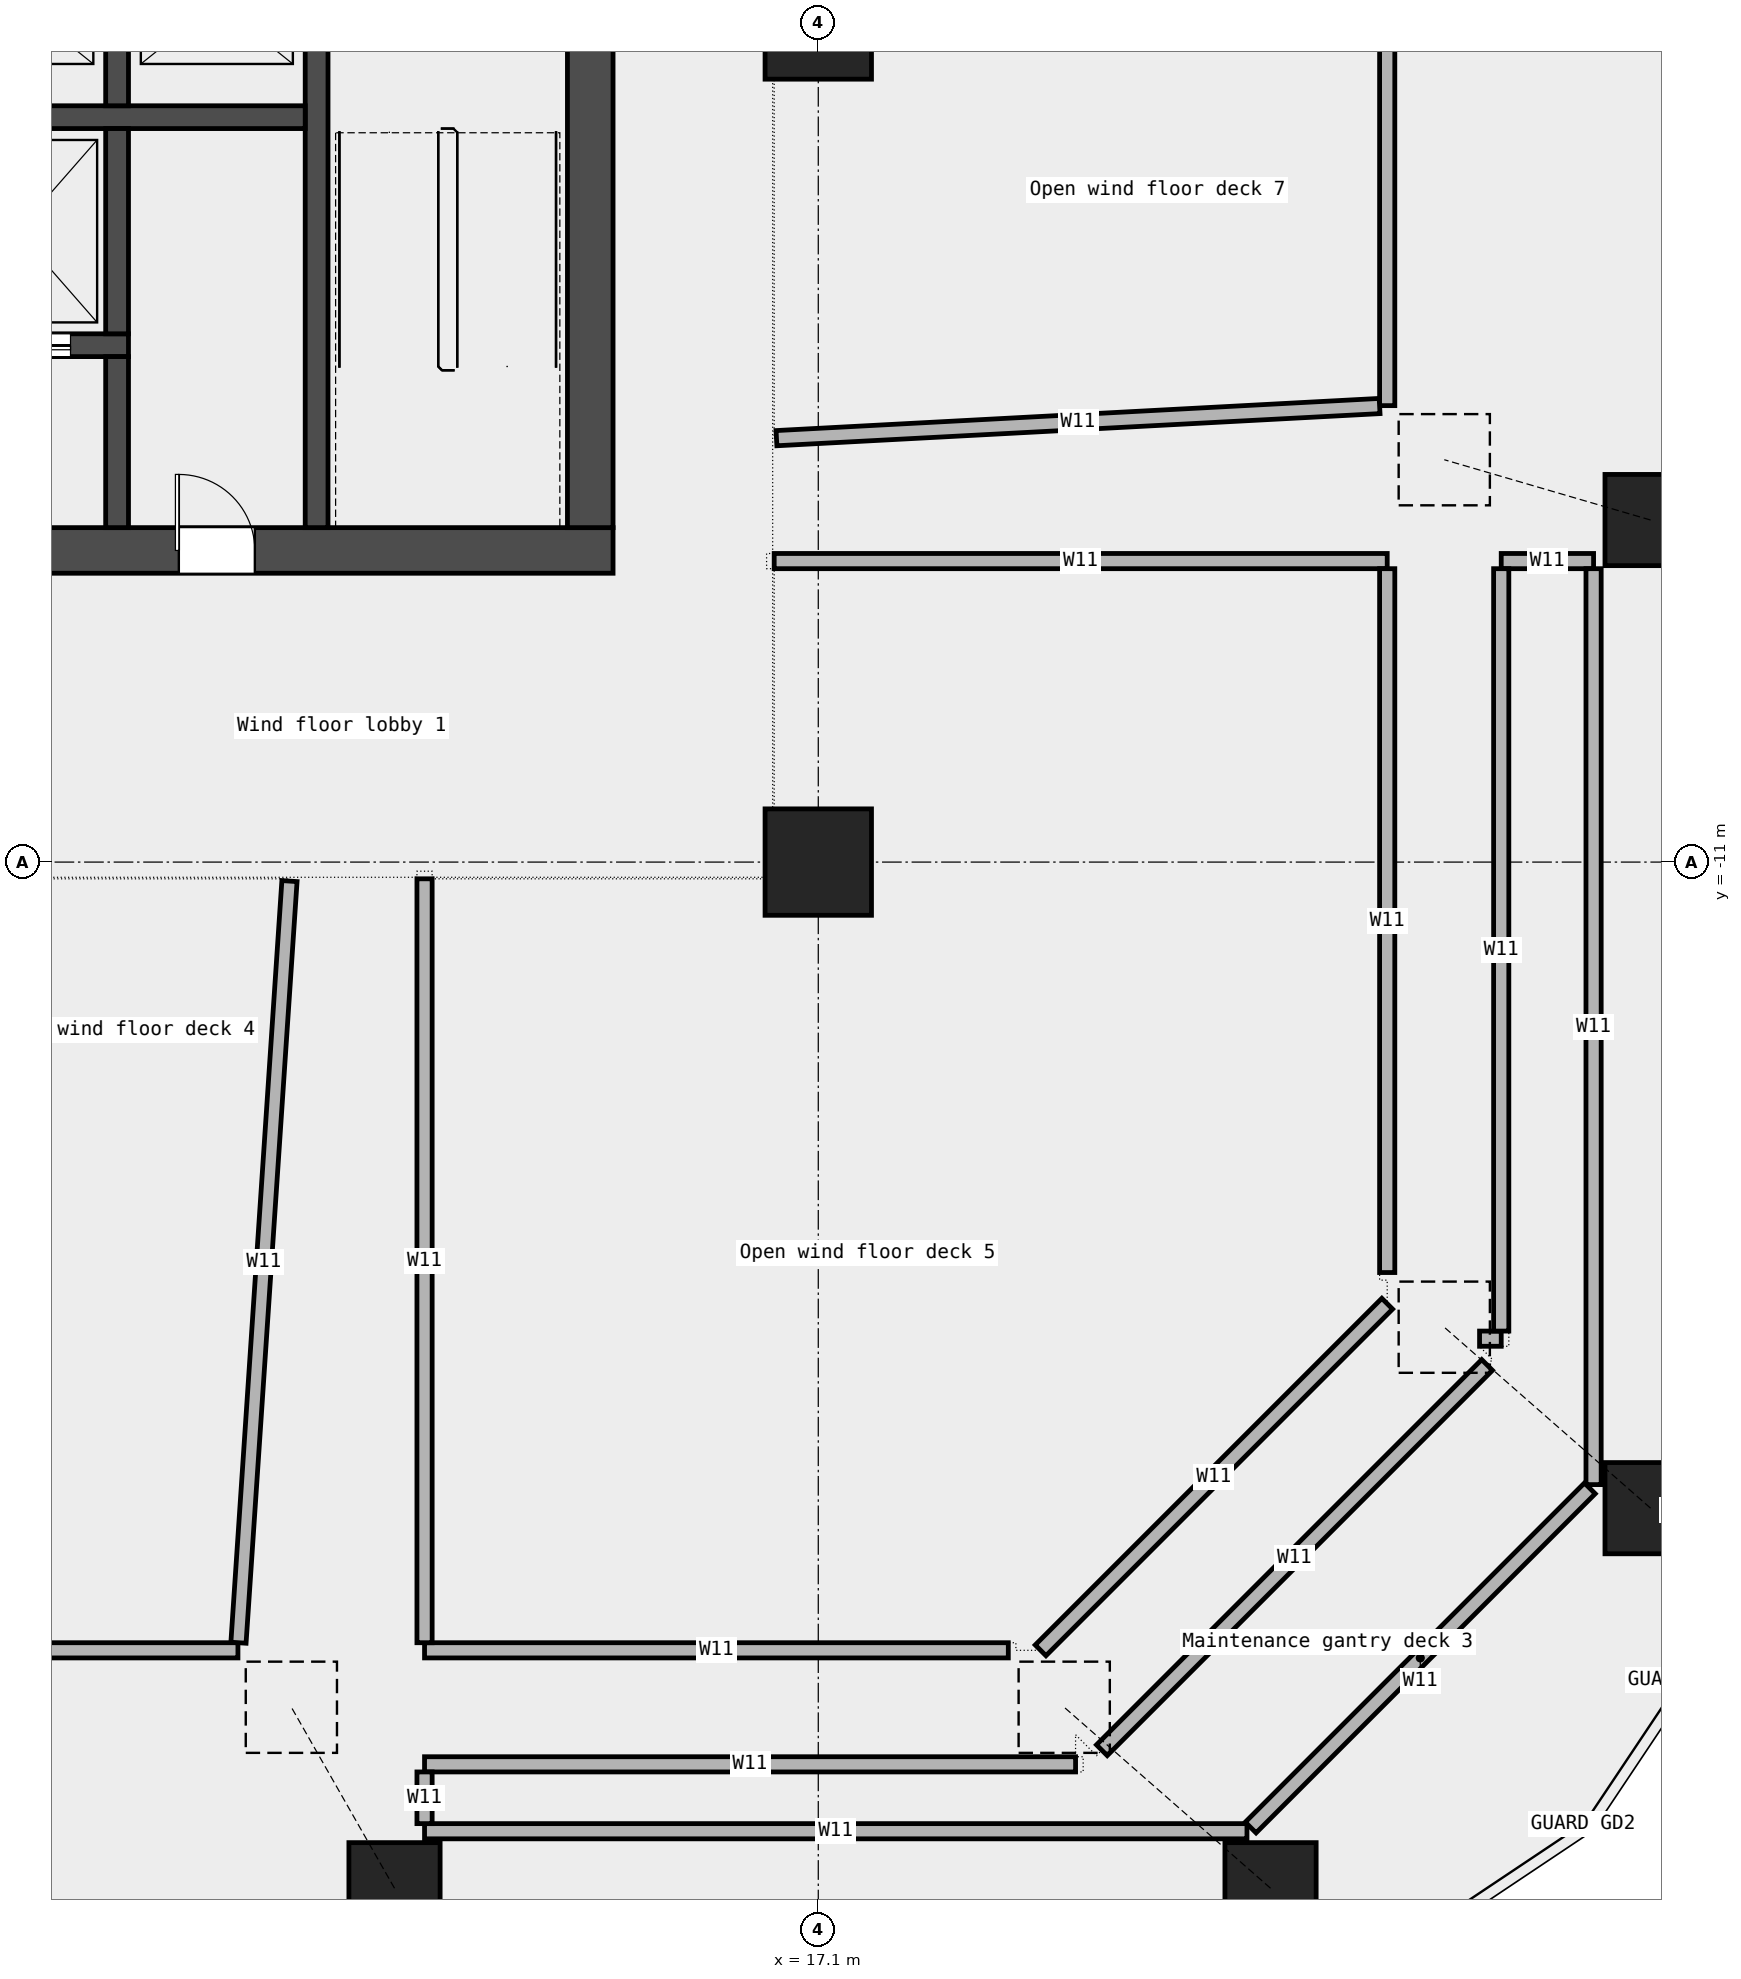
"""IFC4 building model, lengths in metres.
Left out: names, types, materials, properties, quantities, classifications, styles, units other than length and angle.
Written with IfcOpenShell. Run it as: python <this file> out.ifc"""

import sys

from ifc_helpers import new_model, si_unit, direction, frame, frame_2d, origin, origin_2d, place, context, subcontext, project, spatial, rectangle, extrude, element, fill, save


model = new_model("IFC4")
c1 = context("Model", 3, precision=1e-05, world=origin(), true_north=direction((0.0, 1.0)))
c2 = subcontext(c1, "Body", "Model", "MODEL_VIEW")
j1 = project(units=[si_unit("LENGTHUNIT", "METRE"), si_unit("PLANEANGLEUNIT", "RADIAN")], contexts=[c1])
p1 = place(None, origin())
s1 = spatial("IfcSite", under=j1, at=p1, CompositionType="ELEMENT")
p2 = place(p1, origin())
s2 = spatial("IfcBuilding", under=s1, at=p2, CompositionType="ELEMENT")
p3 = place(p2, frame((0.0, 0.0, 148.6)))
s3 = spatial("IfcBuildingStorey", under=s2, at=p3, CompositionType="ELEMENT", Elevation=148.6)
p4 = place(p3, frame((11.525, -24.5, 0.0), z_axis=(-0.160463379213, 0.281547116603, 0.94603526629), x_axis=(-0.868801799195, -0.495160008196, 0.0)))
e1 = element("IfcColumn", 1, at=p4, inside=s3, PredefinedType="COLUMN", context=c2, shape_type="SweptSolid", body=[
    extrude(rectangle(XDim=1.2, YDim=1.2, at=origin_2d()), origin(), (0.0, 0.0, 1.0), 8.456),
])
for number, where, z_axis, x_axis in (
    (2, (23.05, -24.5, 0.0), (-0.309, 0.271, 0.911), (-0.659, -0.752, 0.0)),
    (3, (28.05, -19.5, 0.0), (-0.309, 0.271, 0.911), (-0.659, -0.752, 0.0)),
):
    element("IfcColumn", number, at=place(p3, frame(where, z_axis=z_axis, x_axis=x_axis)), inside=s3, PredefinedType="COLUMN", context=c2, shape_type="SweptSolid", body=[
        extrude(rectangle(XDim=1.2, YDim=1.2, at=origin_2d()), origin(), (0.0, 0.0, 1.0), 8.777),
    ])
p5 = place(p3, frame((28.05, -6.5, 0.0), z_axis=(-0.319895858585, 0.093511561468, 0.942826721902), x_axis=(-0.280576780783, -0.95983158423, 0.0)))
e4 = element("IfcColumn", 4, at=p5, inside=s3, PredefinedType="COLUMN", context=c2, shape_type="SweptSolid", body=[
    extrude(rectangle(XDim=1.2, YDim=1.2, at=origin_2d()), origin(), (0.0, 0.0, 1.0), 8.485),
])
for number, where, z_axis, x_axis in (
    (5, (17.1, -11.0, 0.0), (0.0, 0.0, 1.0), (1.0, 0.0, 0.0)),
    (6, (17.1, 0.0, 0.0), (0.0, 0.0, 1.0), (1.0, 0.0, 0.0)),
):
    element("IfcColumn", number, at=place(p3, frame(where, z_axis=z_axis, x_axis=x_axis)), inside=s3, PredefinedType="COLUMN", context=c2, shape_type="SweptSolid", body=[
        extrude(rectangle(XDim=1.4, YDim=1.4, at=origin_2d()), origin(), (0.0, 0.0, 1.0), 8.0),
    ])
p6 = place(p3, frame((11.92, -23.75, 0.0), z_axis=(0.0, 0.0, 1.0), x_axis=(1.0, 0.0, 0.0)))
e7 = element("IfcWall", 7, at=p6, inside=s3, PredefinedType="PARTITIONING", context=c2, shape_type="SweptSolid", body=[
    extrude(rectangle(XDim=10.82, YDim=0.2, at=frame_2d((5.41, 0.0))), origin(), (0.0, 0.0, 1.0), 8.0),
])
p7 = place(p3, frame((11.92, -22.87, 0.0), z_axis=(0.0, 0.0, 1.0), x_axis=(1.0, 0.0, 0.0)))
e8 = element("IfcWall", 8, at=p7, inside=s3, PredefinedType="PARTITIONING", context=c2, shape_type="SweptSolid", body=[
    extrude(rectangle(XDim=8.565, YDim=0.2, at=frame_2d((4.283, 0.0))), origin(), (0.0, 0.0, 1.0), 8.0),
])
p8 = place(p3, frame((0.6, -21.37, 0.0), z_axis=(0.0, 0.0, 1.0), x_axis=(1.0, 0.0, 0.0)))
e9 = element("IfcWall", 9, at=p8, inside=s3, PredefinedType="PARTITIONING", context=c2, shape_type="SweptSolid", body=[
    extrude(rectangle(XDim=8.865, YDim=0.2, at=frame_2d((4.433, 0.0))), origin(), (0.0, 0.0, 1.0), 8.0),
])
p9 = place(p3, frame((11.92, -21.37, 0.0), z_axis=(0.0, 0.0, 1.0), x_axis=(1.0, 0.0, 0.0)))
e10 = element("IfcWall", 10, at=p9, inside=s3, PredefinedType="PARTITIONING", context=c2, shape_type="SweptSolid", body=[
    extrude(rectangle(XDim=7.68, YDim=0.2, at=frame_2d((3.84, 0.0))), origin(), (0.0, 0.0, 1.0), 8.0),
])
p10 = place(p3, frame((25.8, -17.27, 0.0), z_axis=(0.0, 0.0, 1.0), x_axis=(1.0, 0.0, 0.0)))
e11 = element("IfcWall", 11, at=p10, inside=s3, PredefinedType="PARTITIONING", context=c2, shape_type="SweptSolid", body=[
    extrude(rectangle(XDim=0.285, YDim=0.2, at=frame_2d((0.143, 0.0))), origin(), (0.0, 0.0, 1.0), 8.0),
])
p11 = place(p3, frame((16.52, -7.04, 0.0), z_axis=(0.0, 0.0, 1.0), x_axis=(1.0, 0.0, 0.0)))
e12 = element("IfcWall", 12, at=p11, inside=s3, PredefinedType="PARTITIONING", context=c2, shape_type="SweptSolid", body=[
    extrude(rectangle(XDim=8.065, YDim=0.2, at=frame_2d((4.032, 0.0))), origin(), (0.0, 0.0, 1.0), 8.0),
])
p12 = place(p3, frame((26.085, -7.04, 0.0), z_axis=(0.0, 0.0, 1.0), x_axis=(1.0, 0.0, 0.0)))
e13 = element("IfcWall", 13, at=p12, inside=s3, PredefinedType="PARTITIONING", context=c2, shape_type="SweptSolid", body=[
    extrude(rectangle(XDim=1.215, YDim=0.2, at=frame_2d((0.607, 0.0))), origin(), (0.0, 0.0, 1.0), 8.0),
])
p13 = place(p3, frame((11.92, -23.65, 0.0), z_axis=(0.0, 0.0, 1.0), x_axis=(0.0, 1.0, 0.0)))
e14 = element("IfcWall", 14, at=p13, inside=s3, PredefinedType="PARTITIONING", context=c2, shape_type="SweptSolid", body=[
    extrude(rectangle(XDim=0.68, YDim=0.2, at=frame_2d((0.34, 0.0))), origin(), (0.0, 0.0, 1.0), 8.0),
])
p14 = place(p3, frame((11.92, -21.27, 0.0), z_axis=(0.0, 0.0, 1.0), x_axis=(0.0, 1.0, 0.0)))
e15 = element("IfcWall", 15, at=p14, inside=s3, PredefinedType="PARTITIONING", context=c2, shape_type="SweptSolid", body=[
    extrude(rectangle(XDim=10.05, YDim=0.2, at=frame_2d((5.025, 0.0))), origin(), (0.0, 0.0, 1.0), 8.0),
])
p15 = place(p3, frame((24.585, -16.4, 0.0), z_axis=(0.0, 0.0, 1.0), x_axis=(0.0, 1.0, 0.0)))
e16 = element("IfcWall", 16, at=p15, inside=s3, PredefinedType="PARTITIONING", context=c2, shape_type="SweptSolid", body=[
    extrude(rectangle(XDim=9.26, YDim=0.2, at=frame_2d((4.63, 0.0))), origin(), (0.0, 0.0, 1.0), 8.0),
])
p16 = place(p3, frame((24.585, -4.995, 0.0), z_axis=(0.0, 0.0, 1.0), x_axis=(0.0, 1.0, 0.0)))
e17 = element("IfcWall", 17, at=p16, inside=s3, PredefinedType="PARTITIONING", context=c2, shape_type="SweptSolid", body=[
    extrude(rectangle(XDim=9.99, YDim=0.2, at=frame_2d((4.995, 0.0))), origin(), (0.0, 0.0, 1.0), 8.0),
])
p17 = place(p3, frame((26.085, -17.17, 0.0), z_axis=(0.0, 0.0, 1.0), x_axis=(0.0, 1.0, 0.0)))
e18 = element("IfcWall", 18, at=p17, inside=s3, PredefinedType="PARTITIONING", context=c2, shape_type="SweptSolid", body=[
    extrude(rectangle(XDim=10.03, YDim=0.2, at=frame_2d((5.015, 0.0))), origin(), (0.0, 0.0, 1.0), 8.0),
])
p18 = place(p3, frame((27.3, -19.19, 0.0), z_axis=(0.0, 0.0, 1.0), x_axis=(0.0, 1.0, 0.0)))
e19 = element("IfcWall", 19, at=p18, inside=s3, PredefinedType="PARTITIONING", context=c2, shape_type="SweptSolid", body=[
    extrude(rectangle(XDim=12.05, YDim=0.2, at=frame_2d((6.025, 0.0))), origin(), (0.0, 0.0, 1.0), 8.0),
])
p19 = place(p3, frame((20.831, -22.684, 0.0), z_axis=(0.0, 0.0, 1.0), x_axis=(0.707089749241, 0.707123812722, 0.0)))
e20 = element("IfcWall", 20, at=p19, inside=s3, PredefinedType="PARTITIONING", context=c2, shape_type="SweptSolid", body=[
    extrude(rectangle(XDim=7.167, YDim=0.2, at=frame_2d((3.583, 0.0))), origin(), (0.0, 0.0, 1.0), 8.0),
])
p20 = place(p3, frame((27.251, -19.239, 0.0), z_axis=(0.0, 0.0, 1.0), x_axis=(-0.707106781187, -0.707106781187, 0.0)))
e21 = element("IfcWall", 21, at=p20, inside=s3, PredefinedType="PARTITIONING", context=c2, shape_type="SweptSolid", body=[
    extrude(rectangle(XDim=6.31, YDim=0.2, at=frame_2d((3.155, 0.0))), origin(), (0.0, 0.0, 1.0), 8.0),
])
p21 = place(p3, frame((10.143, -11.25, 0.0), z_axis=(0.0, 0.0, 1.0), x_axis=(-0.066830422332, -0.997764348256, 0.0)))
e22 = element("IfcWall", 22, at=p21, inside=s3, PredefinedType="PARTITIONING", context=c2, shape_type="SweptSolid", body=[
    extrude(rectangle(XDim=10.042, YDim=0.2, at=frame_2d((5.021, 0.0))), origin(), (0.0, 0.0, 1.0), 8.0),
])
p22 = place(p3, frame((24.585, -16.81, 0.0), z_axis=(0.0, 0.0, 1.0), x_axis=(-0.707106781187, -0.707106781187, 0.0)))
e23 = element("IfcWall", 23, at=p22, inside=s3, PredefinedType="PARTITIONING", context=c2, shape_type="SweptSolid", body=[
    extrude(rectangle(XDim=6.449, YDim=0.2, at=frame_2d((3.225, 0.0))), origin(), (0.0, 0.0, 1.0), 8.0),
])
p23 = place(p3, frame((24.485, -5.0, 0.0), z_axis=(0.0, 0.0, 1.0), x_axis=(-0.998581523525, -0.053244162829, 0.0)))
e24 = element("IfcWall", 24, at=p23, inside=s3, PredefinedType="PARTITIONING", context=c2, shape_type="SweptSolid", body=[
    extrude(rectangle(XDim=7.946, YDim=0.2, at=frame_2d((3.973, 0.0))), origin(), (0.0, 0.0, 1.0), 8.0),
])
p24 = place(p3, frame((-14.4, -6.9, 0.0), z_axis=(0.0, 0.0, 1.0), x_axis=(1.0, 0.0, 0.0)))
e25 = element("IfcWall", 25, at=p24, inside=s3, PredefinedType="SHEAR", context=c2, shape_type="SweptSolid", body=[
    extrude(rectangle(XDim=28.8, YDim=0.6, at=frame_2d((14.4, 0.0))), origin(), (0.0, 0.0, 1.0), 8.1),
])
p25 = place(p24, frame((4.337, 0.0, 0.0)))
e26 = element("IfcOpeningElement", 26, at=p25, cuts=e25, PredefinedType="OPENING", context=c2, shape_type="SweptSolid", body=[
    extrude(rectangle(XDim=1.0, YDim=2.1, at=frame_2d((0.5, 1.05))), frame((0.0, 0.312, 0.0), z_axis=(0.0, -1.0, 0.0), x_axis=(1.0, 0.0, 0.0)), (0.0, 0.0, 1.0), 0.624),
])
p26 = place(p24, frame((6.212, 0.0, 0.0)))
e27 = element("IfcOpeningElement", 27, at=p26, cuts=e25, PredefinedType="OPENING", context=c2, shape_type="SweptSolid", body=[
    extrude(rectangle(XDim=1.0, YDim=2.1, at=frame_2d((0.5, 1.05))), frame((0.0, 0.312, 0.0), z_axis=(0.0, -1.0, 0.0), x_axis=(1.0, 0.0, 0.0)), (0.0, 0.0, 1.0), 0.624),
])
p27 = place(p24, frame((10.425, 0.0, 0.0)))
e28 = element("IfcOpeningElement", 28, at=p27, cuts=e25, PredefinedType="OPENING", context=c2, shape_type="SweptSolid", body=[
    extrude(rectangle(XDim=1.2, YDim=2.1, at=frame_2d((0.6, 1.05))), frame((0.0, 0.312, 0.0), z_axis=(0.0, -1.0, 0.0), x_axis=(1.0, 0.0, 0.0)), (0.0, 0.0, 1.0), 0.624),
])
p28 = place(p24, frame((15.212, 0.0, 0.0)))
e29 = element("IfcOpeningElement", 29, at=p28, cuts=e25, PredefinedType="OPENING", context=c2, shape_type="SweptSolid", body=[
    extrude(rectangle(XDim=1.0, YDim=2.1, at=frame_2d((0.5, 1.05))), frame((0.0, 0.312, 0.0), z_axis=(0.0, -1.0, 0.0), x_axis=(1.0, 0.0, 0.0)), (0.0, 0.0, 1.0), 0.624),
])
p29 = place(p24, frame((18.75, 0.0, 0.0)))
e30 = element("IfcOpeningElement", 30, at=p29, cuts=e25, PredefinedType="OPENING", context=c2, shape_type="SweptSolid", body=[
    extrude(rectangle(XDim=1.8, YDim=2.1, at=frame_2d((0.9, 1.05))), frame((0.0, 0.312, 0.0), z_axis=(0.0, -1.0, 0.0), x_axis=(1.0, 0.0, 0.0)), (0.0, 0.0, 1.0), 0.624),
])
p30 = place(p24, frame((23.087, 0.0, 0.0)))
e31 = element("IfcOpeningElement", 31, at=p30, cuts=e25, PredefinedType="OPENING", context=c2, shape_type="SweptSolid", body=[
    extrude(rectangle(XDim=1.0, YDim=2.1, at=frame_2d((0.5, 1.05))), frame((0.0, 0.312, 0.0), z_axis=(0.0, -1.0, 0.0), x_axis=(1.0, 0.0, 0.0)), (0.0, 0.0, 1.0), 0.624),
])
p31 = place(p3, frame((14.1, -6.6, 0.0), z_axis=(0.0, 0.0, 1.0), x_axis=(0.0, 1.0, 0.0)))
e32 = element("IfcWall", 32, at=p31, inside=s3, PredefinedType="SHEAR", context=c2, shape_type="SweptSolid", body=[
    extrude(rectangle(XDim=19.5, YDim=0.6, at=frame_2d((9.75, 0.0))), origin(), (0.0, 0.0, 1.0), 8.1),
])
p32 = place(p31, frame((9.3, 0.0, 0.0)))
e33 = element("IfcOpeningElement", 33, at=p32, cuts=e32, PredefinedType="OPENING", context=c2, shape_type="SweptSolid", body=[
    extrude(rectangle(XDim=1.8, YDim=2.1, at=frame_2d((0.9, 1.05))), frame((0.0, 0.312, 0.0), z_axis=(0.0, -1.0, 0.0), x_axis=(1.0, 0.0, 0.0)), (0.0, 0.0, 1.0), 0.624),
])
p33 = place(p3, frame((10.5, -6.6, 0.0), z_axis=(0.0, 0.0, 1.0), x_axis=(0.0, 1.0, 0.0)))
e34 = element("IfcWall", 34, at=p33, inside=s3, PredefinedType="SHEAR", context=c2, shape_type="SweptSolid", body=[
    extrude(rectangle(XDim=8.55, YDim=0.3, at=frame_2d((4.275, 0.0))), origin(), (0.0, 0.0, 1.0), 8.1),
])
p34 = place(p3, frame((-10.35, -1.2, 0.0), z_axis=(0.0, 0.0, 1.0), x_axis=(1.0, 0.0, 0.0)))
e35 = element("IfcWall", 35, at=p34, inside=s3, PredefinedType="SOLIDWALL", context=c2, shape_type="SweptSolid", body=[
    extrude(rectangle(XDim=20.7, YDim=0.3, at=frame_2d((10.35, 0.0))), origin(), (0.0, 0.0, 1.0), 8.1),
])
p35 = place(p3, frame((7.875, -1.05, 0.0), z_axis=(0.0, 0.0, 1.0), x_axis=(0.0, 1.0, 0.0)))
e36 = element("IfcWall", 36, at=p35, inside=s3, PredefinedType="SOLIDWALL", context=c2, shape_type="SweptSolid", body=[
    extrude(rectangle(XDim=2.7, YDim=0.3, at=frame_2d((1.35, 0.0))), origin(), (0.0, 0.0, 1.0), 8.1),
])
p36 = place(p3, frame((2.475, -4.2, 0.0), z_axis=(0.0, 0.0, 1.0), x_axis=(1.0, 0.0, 0.0)))
e37 = element("IfcWall", 37, at=p36, inside=s3, PredefinedType="SOLIDWALL", context=c2, shape_type="SweptSolid", body=[
    extrude(rectangle(XDim=5.55, YDim=0.3, at=frame_2d((2.775, 0.0))), origin(), (0.0, 0.0, 1.0), 8.1),
])
p37 = place(p36, frame((0.762, 0.0, 0.0)))
e38 = element("IfcOpeningElement", 38, at=p37, cuts=e37, PredefinedType="OPENING", context=c2, shape_type="SweptSolid", body=[
    extrude(rectangle(XDim=1.4, YDim=2.1, at=frame_2d((0.7, 1.05))), frame((0.0, 0.162, 0.0), z_axis=(0.0, -1.0, 0.0), x_axis=(1.0, 0.0, 0.0)), (0.0, 0.0, 1.0), 0.324),
])
p38 = place(p36, frame((3.387, 0.0, 0.0)))
e39 = element("IfcOpeningElement", 39, at=p38, cuts=e37, PredefinedType="OPENING", context=c2, shape_type="SweptSolid", body=[
    extrude(rectangle(XDim=1.4, YDim=2.1, at=frame_2d((0.7, 1.05))), frame((0.0, 0.162, 0.0), z_axis=(0.0, -1.0, 0.0), x_axis=(1.0, 0.0, 0.0)), (0.0, 0.0, 1.0), 0.324),
])
p39 = place(p3, frame((7.875, -4.05, 0.0), z_axis=(0.0, 0.0, 1.0), x_axis=(0.0, 1.0, 0.0)))
e40 = element("IfcWall", 40, at=p39, inside=s3, PredefinedType="SOLIDWALL", context=c2, shape_type="SweptSolid", body=[
    extrude(rectangle(XDim=2.7, YDim=0.3, at=frame_2d((1.35, 0.0))), origin(), (0.0, 0.0, 1.0), 8.1),
])
p40 = place(p3, frame((7.875, -6.6, 0.0), z_axis=(0.0, 0.0, 1.0), x_axis=(0.0, 1.0, 0.0)))
e41 = element("IfcWall", 41, at=p40, inside=s3, PredefinedType="SOLIDWALL", context=c2, shape_type="SweptSolid", body=[
    extrude(rectangle(XDim=2.25, YDim=0.3, at=frame_2d((1.125, 0.0))), origin(), (0.0, 0.0, 1.0), 8.1),
])
p41 = place(p38, origin())
e42 = element("IfcDoor", 42, at=p41, inside=s3, OperationType="DOUBLE_DOOR_SLIDING", PredefinedType="DOOR", context=c2, shape_type="SweptSolid", body=[
    extrude(rectangle(XDim=1.4, YDim=2.1, at=frame_2d((0.7, 1.05))), frame((0.0, 0.025, 0.0), z_axis=(0.0, -1.0, 0.0), x_axis=(1.0, 0.0, 0.0)), (0.0, 0.0, 1.0), 0.05),
])
fill(e39, e42)
p42 = place(p30, origin())
e43 = element("IfcDoor", 43, at=p42, inside=s3, OperationType="SINGLE_SWING_LEFT", PredefinedType="DOOR", context=c2, shape_type="SweptSolid", body=[
    extrude(rectangle(XDim=1.0, YDim=2.1, at=frame_2d((0.5, 1.05))), frame((0.0, 0.025, 0.0), z_axis=(0.0, -1.0, 0.0), x_axis=(1.0, 0.0, 0.0)), (0.0, 0.0, 1.0), 0.05),
])
fill(e31, e43)
save(model, sys.argv[1])
